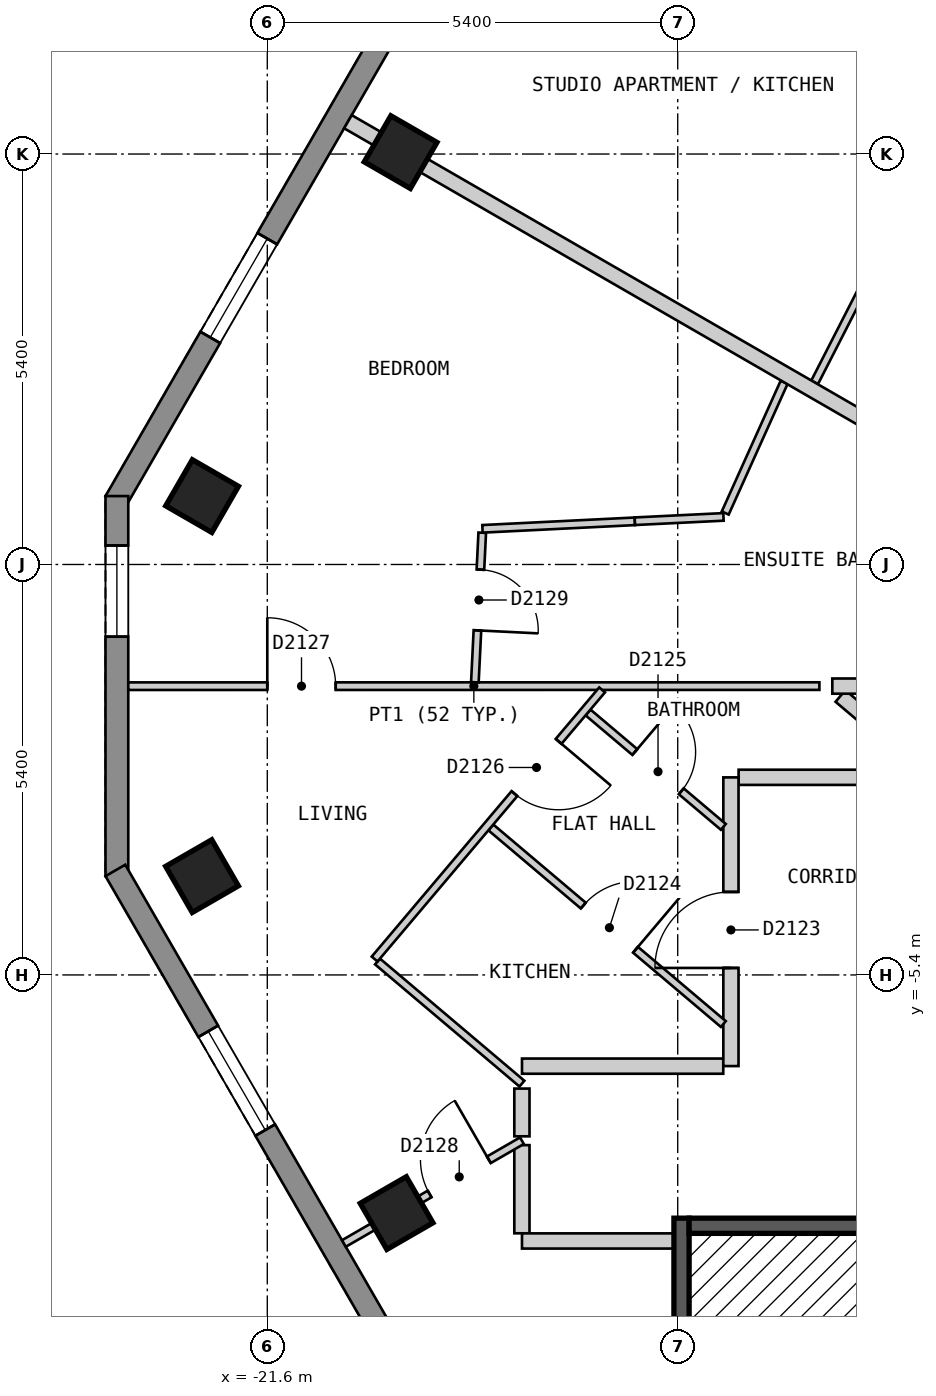
"""IFC4 building model, lengths in metres.
Left out: names, types, materials, properties, quantities, classifications, styles, units other than length and angle.
Written with IfcOpenShell. Run it as: python <this file> out.ifc"""

import sys

from ifc_helpers import new_model, si_unit, direction, frame, frame_2d, origin, origin_2d, place, context, subcontext, project, spatial, polyline, rectangle, outline, extrude, element, fill, save


model = new_model("IFC4")
c1 = context("Model", 3, precision=1e-05, world=origin(), true_north=direction((0.0, 1.0)))
c2 = subcontext(c1, "Body", "Model", "MODEL_VIEW")
j1 = project(units=[si_unit("LENGTHUNIT", "METRE"), si_unit("PLANEANGLEUNIT", "RADIAN")], contexts=[c1])
p1 = place(None, origin())
s1 = spatial("IfcSite", under=j1, at=p1, CompositionType="ELEMENT")
p2 = place(p1, origin())
s2 = spatial("IfcBuilding", under=s1, at=p2, CompositionType="ELEMENT")
p3 = place(p2, frame((0.0, 0.0, 205.8)))
s3 = spatial("IfcBuildingStorey", under=s2, at=p3, CompositionType="ELEMENT", Elevation=205.8)
for number, where, z_axis, x_axis in (
    (1, (-19.846, 5.425, 0.0), (0.0, 0.0, 1.0), (-0.5, -0.866, 0.0)),
    (2, (-22.458, 0.9, 0.0), (0.0, 0.0, 1.0), (-0.5, -0.866, 0.0)),
    (3, (-22.459, -4.1, 0.0), (0.0, 0.0, 1.0), (0.5, -0.866, 0.0)),
    (4, (-19.899, -8.533, 0.0), (0.0, 0.0, 1.0), (0.5, -0.866, 0.0)),
):
    element("IfcColumn", number, at=place(p3, frame(where, z_axis=z_axis, x_axis=x_axis)), inside=s3, PredefinedType="COLUMN", context=c2, shape_type="SweptSolid", body=[
        extrude(rectangle(XDim=0.7, YDim=0.7, at=origin_2d()), origin(), (0.0, 0.0, 1.0), 3.0),
    ])
p4 = place(p3, frame((-12.514, 20.025, 0.0), z_axis=(0.0, 0.0, 1.0), x_axis=(-0.500003656944, -0.866023292436, 0.0)))
e5 = element("IfcWall", 5, at=p4, inside=s3, PredefinedType="SOLIDWALL", context=c2, shape_type="SweptSolid", body=[
    extrude(outline(polyline([(0.0, -0.15), (22.17, -0.15), (22.09, 0.15), (0.08, 0.15), (0.0, -0.15)])), origin(), (0.0, 0.0, 1.0), 2.7),
])
p5 = place(p4, frame((2.497, 0.0, 0.15)))
e6 = element("IfcOpeningElement", 6, at=p5, cuts=e5, PredefinedType="OPENING", context=c2, shape_type="SweptSolid", body=[
    extrude(rectangle(XDim=1.5, YDim=2.1, at=frame_2d((0.75, 1.05))), frame((0.0, 0.16, 0.0), z_axis=(0.0, -1.0, 0.0), x_axis=(1.0, 0.0, 0.0)), (0.0, 0.0, 1.0), 0.32),
])
p6 = place(p4, frame((7.722, 0.0, 0.15)))
e7 = element("IfcOpeningElement", 7, at=p6, cuts=e5, PredefinedType="OPENING", context=c2, shape_type="SweptSolid", body=[
    extrude(rectangle(XDim=1.5, YDim=2.1, at=frame_2d((0.75, 1.05))), frame((0.0, 0.16, 0.0), z_axis=(0.0, -1.0, 0.0), x_axis=(1.0, 0.0, 0.0)), (0.0, 0.0, 1.0), 0.32),
])
p7 = place(p4, frame((12.948, 0.0, 0.15)))
e8 = element("IfcOpeningElement", 8, at=p7, cuts=e5, PredefinedType="OPENING", context=c2, shape_type="SweptSolid", body=[
    extrude(rectangle(XDim=1.5, YDim=2.1, at=frame_2d((0.75, 1.05))), frame((0.0, 0.16, 0.0), z_axis=(0.0, -1.0, 0.0), x_axis=(1.0, 0.0, 0.0)), (0.0, 0.0, 1.0), 0.32),
])
p8 = place(p4, frame((18.173, 0.0, 0.15)))
e9 = element("IfcOpeningElement", 9, at=p8, cuts=e5, PredefinedType="OPENING", context=c2, shape_type="SweptSolid", body=[
    extrude(rectangle(XDim=1.5, YDim=2.1, at=frame_2d((0.75, 1.05))), frame((0.0, 0.16, 0.0), z_axis=(0.0, -1.0, 0.0), x_axis=(1.0, 0.0, 0.0)), (0.0, 0.0, 1.0), 0.32),
])
p9 = place(p3, frame((-23.579, 0.9, 0.0), z_axis=(0.0, 0.0, 1.0), x_axis=(0.0, -1.0, 0.0)))
e10 = element("IfcWall", 10, at=p9, inside=s3, PredefinedType="SOLIDWALL", context=c2, shape_type="SweptSolid", body=[
    extrude(outline(polyline([(0.0, -0.15), (5.0, -0.15), (4.92, 0.15), (0.08, 0.15), (0.0, -0.15)])), origin(), (0.0, 0.0, 1.0), 2.7),
])
p10 = place(p9, frame((0.65, 0.0, 0.15)))
e11 = element("IfcOpeningElement", 11, at=p10, cuts=e10, PredefinedType="OPENING", context=c2, shape_type="SweptSolid", body=[
    extrude(rectangle(XDim=1.2, YDim=2.1, at=frame_2d((0.6, 1.05))), frame((0.0, 0.16, 0.0), z_axis=(0.0, -1.0, 0.0), x_axis=(1.0, 0.0, 0.0)), (0.0, 0.0, 1.0), 0.32),
])
p11 = place(p3, frame((-23.599, -4.025, 0.0), z_axis=(0.0, 0.0, 1.0), x_axis=(0.500012653391, -0.866018098222, 0.0)))
e12 = element("IfcWall", 12, at=p11, inside=s3, PredefinedType="SOLIDWALL", context=c2, shape_type="SweptSolid", body=[
    extrude(outline(polyline([(0.0, -0.15), (16.628, -0.15), (16.548, 0.15), (0.08, 0.15), (0.0, -0.15)])), origin(), (0.0, 0.0, 1.0), 2.7),
])
p12 = place(p11, frame((2.444, 0.0, 0.15)))
e13 = element("IfcOpeningElement", 13, at=p12, cuts=e12, PredefinedType="OPENING", context=c2, shape_type="SweptSolid", body=[
    extrude(rectangle(XDim=1.5, YDim=2.1, at=frame_2d((0.75, 1.05))), frame((0.0, 0.16, 0.0), z_axis=(0.0, -1.0, 0.0), x_axis=(1.0, 0.0, 0.0)), (0.0, 0.0, 1.0), 0.32),
])
p13 = place(p11, frame((7.564, 0.0, 0.15)))
e14 = element("IfcOpeningElement", 14, at=p13, cuts=e12, PredefinedType="OPENING", context=c2, shape_type="SweptSolid", body=[
    extrude(rectangle(XDim=1.5, YDim=2.1, at=frame_2d((0.75, 1.05))), frame((0.0, 0.16, 0.0), z_axis=(0.0, -1.0, 0.0), x_axis=(1.0, 0.0, 0.0)), (0.0, 0.0, 1.0), 0.32),
])
p14 = place(p11, frame((12.682, 0.0, 0.15)))
e15 = element("IfcOpeningElement", 15, at=p14, cuts=e12, PredefinedType="OPENING", context=c2, shape_type="SweptSolid", body=[
    extrude(rectangle(XDim=1.5, YDim=2.1, at=frame_2d((0.75, 1.05))), frame((0.0, 0.16, 0.0), z_axis=(0.0, -1.0, 0.0), x_axis=(1.0, 0.0, 0.0)), (0.0, 0.0, 1.0), 0.32),
])
p15 = place(p3, frame((-18.25, -7.639, 0.0), z_axis=(0.0, 0.0, 1.0), x_axis=(0.0, -1.0, 0.0)))
e16 = element("IfcWall", 16, at=p15, inside=s3, PredefinedType="PARTITIONING", context=c2, shape_type="SweptSolid", body=[
    extrude(rectangle(XDim=1.16, YDim=0.2, at=frame_2d((0.58, 0.0))), origin(), (0.0, 0.0, 1.0), 2.7),
])
p16 = place(p3, frame((-18.249, -6.6, 0.0), z_axis=(0.0, 0.0, 1.0), x_axis=(1.0, 0.0, 0.0)))
e17 = element("IfcWall", 17, at=p16, inside=s3, PredefinedType="PARTITIONING", context=c2, shape_type="SweptSolid", body=[
    extrude(rectangle(XDim=2.648, YDim=0.2, at=frame_2d((1.324, 0.0))), origin(), (0.0, 0.0, 1.0), 2.7),
])
p17 = place(p3, frame((-18.249, -8.9, 0.0), z_axis=(0.0, 0.0, 1.0), x_axis=(1.0, 0.0, 0.0)))
e18 = element("IfcWall", 18, at=p17, inside=s3, PredefinedType="PARTITIONING", context=c2, shape_type="SweptSolid", body=[
    extrude(rectangle(XDim=2.199, YDim=0.2, at=frame_2d((1.1, 0.0))), origin(), (0.0, 0.0, 1.0), 2.7),
])
p18 = place(p3, frame((-15.399, -2.8, 0.0), z_axis=(0.0, 0.0, 1.0), x_axis=(1.0, 0.0, 0.0)))
e19 = element("IfcWall", 19, at=p18, inside=s3, PredefinedType="PARTITIONING", context=c2, shape_type="SweptSolid", body=[
    extrude(rectangle(XDim=1.825, YDim=0.2, at=frame_2d((0.913, 0.0))), origin(), (0.0, 0.0, 1.0), 2.7),
])
p19 = place(p3, frame((-15.5, -6.599, 0.0), z_axis=(0.0, 0.0, 1.0), x_axis=(0.0, 1.0, 0.0)))
e20 = element("IfcWall", 20, at=p19, inside=s3, PredefinedType="PARTITIONING", context=c2, shape_type="SweptSolid", body=[
    extrude(rectangle(XDim=3.798, YDim=0.2, at=frame_2d((1.899, 0.0))), origin(), (0.0, 0.0, 1.0), 2.7),
])
p20 = place(p19, frame((1.291, 0.0, 0.0)))
e21 = element("IfcOpeningElement", 21, at=p20, cuts=e20, PredefinedType="OPENING", context=c2, shape_type="SweptSolid", body=[
    extrude(rectangle(XDim=1.0, YDim=2.1, at=frame_2d((0.5, 1.05))), frame((0.0, 0.11, 0.0), z_axis=(0.0, -1.0, 0.0), x_axis=(1.0, 0.0, 0.0)), (0.0, 0.0, 1.0), 0.22),
])
p21 = place(p3, frame((-18.25, -7.523, 0.0), z_axis=(0.0, 0.0, 1.0), x_axis=(0.0, 1.0, 0.0)))
e22 = element("IfcWall", 22, at=p21, inside=s3, PredefinedType="PARTITIONING", context=c2, shape_type="SweptSolid", body=[
    extrude(rectangle(XDim=0.628, YDim=0.2, at=frame_2d((0.314, 0.0))), origin(), (0.0, 0.0, 1.0), 2.7),
])
p22 = place(p3, frame((-17.38, -1.947, 0.0), z_axis=(0.0, 0.0, 1.0), x_axis=(0.763616683524, -0.645669854217, 0.0)))
e23 = element("IfcWall", 23, at=p22, inside=s3, PredefinedType="PARTITIONING", context=c2, shape_type="SweptSolid", body=[
    extrude(rectangle(XDim=2.331, YDim=0.1, at=frame_2d((1.166, 0.0))), origin(), (0.0, 0.0, 1.0), 2.7),
])
p23 = place(p22, frame((0.806, 0.0, 0.0)))
e24 = element("IfcOpeningElement", 24, at=p23, cuts=e23, PredefinedType="OPENING", context=c2, shape_type="SweptSolid", body=[
    extrude(rectangle(XDim=0.8, YDim=2.1, at=frame_2d((0.4, 1.05))), frame((0.0, 0.06, 0.0), z_axis=(0.0, -1.0, 0.0), x_axis=(1.0, 0.0, 0.0)), (0.0, 0.0, 1.0), 0.12),
])
p24 = place(p3, frame((-18.659, -3.459, 0.0), z_axis=(0.0, 0.0, 1.0), x_axis=(0.763550385572, -0.64574825489, 0.0)))
e25 = element("IfcWall", 25, at=p24, inside=s3, PredefinedType="PARTITIONING", context=c2, shape_type="SweptSolid", body=[
    extrude(rectangle(XDim=4.006, YDim=0.1, at=frame_2d((2.003, 0.0))), origin(), (0.0, 0.0, 1.0), 2.7),
])
p25 = place(p24, frame((1.593, 0.0, 0.0)))
e26 = element("IfcOpeningElement", 26, at=p25, cuts=e25, PredefinedType="OPENING", context=c2, shape_type="SweptSolid", body=[
    extrude(rectangle(XDim=0.9, YDim=2.1, at=frame_2d((0.45, 1.05))), frame((0.0, 0.06, 0.0), z_axis=(0.0, -1.0, 0.0), x_axis=(1.0, 0.0, 0.0)), (0.0, 0.0, 1.0), 0.12),
])
p26 = place(p3, frame((-20.15, -5.223, 0.0), z_axis=(0.0, 0.0, 1.0), x_axis=(0.763471868926, -0.645841083672, 0.0)))
e27 = element("IfcWall", 27, at=p26, inside=s3, PredefinedType="PARTITIONING", context=c2, shape_type="SweptSolid", body=[
    extrude(rectangle(XDim=2.489, YDim=0.1, at=frame_2d((1.244, 0.0))), origin(), (0.0, 0.0, 1.0), 2.7),
])
p27 = place(p3, frame((-23.429, -1.601, 0.0), z_axis=(0.0, 0.0, 1.0), x_axis=(0.999999994233, 0.000107396965, 0.0)))
e28 = element("IfcWall", 28, at=p27, inside=s3, PredefinedType="PARTITIONING", context=c2, shape_type="SweptSolid", body=[
    extrude(rectangle(XDim=9.093, YDim=0.1, at=frame_2d((4.546, 0.0))), origin(), (0.0, 0.0, 1.0), 2.7),
])
p28 = place(p27, frame((1.829, 0.0, 0.0)))
e29 = element("IfcOpeningElement", 29, at=p28, cuts=e28, PredefinedType="OPENING", context=c2, shape_type="SweptSolid", body=[
    extrude(rectangle(XDim=0.9, YDim=2.1, at=frame_2d((0.45, 1.05))), frame((0.0, 0.06, 0.0), z_axis=(0.0, -1.0, 0.0), x_axis=(1.0, 0.0, 0.0)), (0.0, 0.0, 1.0), 0.12),
])
p29 = place(p3, frame((-20.188, -5.191, 0.0), z_axis=(0.0, 0.0, 1.0), x_axis=(0.645524337256, 0.763739700429, 0.0)))
e30 = element("IfcWall", 30, at=p29, inside=s3, PredefinedType="PARTITIONING", context=c2, shape_type="SweptSolid", body=[
    extrude(rectangle(XDim=4.636, YDim=0.1, at=frame_2d((2.318, 0.0))), origin(), (0.0, 0.0, 1.0), 2.7),
])
p30 = place(p29, frame((2.85, 0.0, 0.0)))
e31 = element("IfcOpeningElement", 31, at=p30, cuts=e30, PredefinedType="OPENING", context=c2, shape_type="SweptSolid", body=[
    extrude(rectangle(XDim=0.9, YDim=2.1, at=frame_2d((0.45, 1.05))), frame((0.0, 0.06, 0.0), z_axis=(0.0, -1.0, 0.0), x_axis=(1.0, 0.0, 0.0)), (0.0, 0.0, 1.0), 0.12),
])
p31 = place(p3, frame((-15.575, 0.677, 0.0), z_axis=(0.0, 0.0, 1.0), x_axis=(0.410768223147, 0.911739802165, 0.0)))
e32 = element("IfcWall", 32, at=p31, inside=s3, PredefinedType="PARTITIONING", context=c2, shape_type="SweptSolid", body=[
    extrude(rectangle(XDim=1.886, YDim=0.1, at=frame_2d((0.943, 0.0))), origin(), (0.0, 0.0, 1.0), 2.7),
])
p32 = place(p3, frame((-14.399, 2.396, 0.0), z_axis=(0.0, 0.0, 1.0), x_axis=(0.455967231787, 0.889996563778, 0.0)))
e33 = element("IfcWall", 33, at=p32, inside=s3, PredefinedType="PARTITIONING", context=c2, shape_type="SweptSolid", body=[
    extrude(rectangle(XDim=3.149, YDim=0.1, at=frame_2d((1.575, 0.0))), origin(), (0.0, 0.0, 1.0), 2.7),
])
p33 = place(p3, frame((-18.869, -1.55, 0.0), z_axis=(0.0, 0.0, 1.0), x_axis=(0.049189853645, 0.998789446429, 0.0)))
e34 = element("IfcWall", 34, at=p33, inside=s3, PredefinedType="PARTITIONING", context=c2, shape_type="SweptSolid", body=[
    extrude(rectangle(XDim=1.97, YDim=0.1, at=frame_2d((0.985, 0.0))), origin(), (0.0, 0.0, 1.0), 2.7),
])
p34 = place(p33, frame((0.684, 0.0, 0.0)))
e35 = element("IfcOpeningElement", 35, at=p34, cuts=e34, PredefinedType="OPENING", context=c2, shape_type="SweptSolid", body=[
    extrude(rectangle(XDim=0.8, YDim=2.1, at=frame_2d((0.4, 1.05))), frame((0.0, 0.06, 0.0), z_axis=(0.0, -1.0, 0.0), x_axis=(1.0, 0.0, 0.0)), (0.0, 0.0, 1.0), 0.12),
])
p35 = place(p3, frame((-18.769, 0.469, 0.0), z_axis=(0.0, 0.0, 1.0), x_axis=(0.998780383332, 0.049373534108, 0.0)))
e36 = element("IfcWall", 36, at=p35, inside=s3, PredefinedType="PARTITIONING", context=c2, shape_type="SweptSolid", body=[
    extrude(rectangle(XDim=2.008, YDim=0.1, at=frame_2d((1.004, 0.0))), origin(), (0.0, 0.0, 1.0), 2.7),
])
p36 = place(p3, frame((-16.764, 0.569, 0.0), z_axis=(0.0, 0.0, 1.0), x_axis=(0.998812102885, 0.048727642373, 0.0)))
e37 = element("IfcWall", 37, at=p36, inside=s3, PredefinedType="PARTITIONING", context=c2, shape_type="SweptSolid", body=[
    extrude(rectangle(XDim=1.167, YDim=0.1, at=frame_2d((0.584, 0.0))), origin(), (0.0, 0.0, 1.0), 2.7),
])
p37 = place(p3, frame((-20.592, -8.933, 0.0), z_axis=(0.0, 0.0, 1.0), x_axis=(0.866045775131, 0.499964714133, 0.0)))
e38 = element("IfcWall", 38, at=p37, inside=s3, PredefinedType="PARTITIONING", context=c2, shape_type="SweptSolid", body=[
    extrude(rectangle(XDim=2.704, YDim=0.1, at=frame_2d((1.352, 0.0))), origin(), (0.0, 0.0, 1.0), 2.7),
])
p38 = place(p37, frame((1.302, 0.0, 0.0)))
e39 = element("IfcOpeningElement", 39, at=p38, cuts=e38, PredefinedType="OPENING", context=c2, shape_type="SweptSolid", body=[
    extrude(rectangle(XDim=0.9, YDim=2.1, at=frame_2d((0.45, 1.05))), frame((0.0, 0.06, 0.0), z_axis=(0.0, -1.0, 0.0), x_axis=(1.0, 0.0, 0.0)), (0.0, 0.0, 1.0), 0.12),
])
p39 = place(p3, frame((-20.539, 5.825, 0.0), z_axis=(0.0, 0.0, 1.0), x_axis=(0.866046068403, -0.499964206122, 0.0)))
e40 = element("IfcWall", 40, at=p39, inside=s3, PredefinedType="PARTITIONING", context=c2, shape_type="SweptSolid", body=[
    extrude(rectangle(XDim=9.995, YDim=0.2, at=frame_2d((4.998, 0.0))), origin(), (0.0, 0.0, 1.0), 2.7),
])
p40 = place(p3, frame((-17.926, 10.35, 0.0), z_axis=(0.0, 0.0, 1.0), x_axis=(0.866018411306, -0.500012111133, 0.0)))
e41 = element("IfcWall", 41, at=p40, inside=s3, PredefinedType="PARTITIONING", context=c2, shape_type="SweptSolid", body=[
    extrude(rectangle(XDim=9.898, YDim=0.2, at=frame_2d((4.949, 0.0))), origin(), (0.0, 0.0, 1.0), 2.7),
])
p41 = place(p3, frame((-14.059, -1.73, 0.0), z_axis=(0.0, 0.0, 1.0), x_axis=(0.763289607824, -0.64605647941, 0.0)))
e42 = element("IfcWall", 42, at=p41, inside=s3, PredefinedType="PARTITIONING", context=c2, shape_type="SweptSolid", body=[
    extrude(rectangle(XDim=0.766, YDim=0.2, at=frame_2d((0.383, 0.0))), origin(), (0.0, 0.0, 1.0), 2.7),
])
p42 = place(p3, frame((-14.166, -1.6, 0.0), z_axis=(0.0, 0.0, 1.0), x_axis=(1.0, 0.0, 0.0)))
e43 = element("IfcWall", 43, at=p42, inside=s3, PredefinedType="PARTITIONING", context=c2, shape_type="SweptSolid", body=[
    extrude(rectangle(XDim=0.973, YDim=0.2, at=frame_2d((0.486, 0.0))), origin(), (0.0, 0.0, 1.0), 2.7),
])
p43 = place(p3, frame((-16.15, -14.4, 0.0), z_axis=(0.0, 0.0, 1.0), x_axis=(0.0, 1.0, 0.0)))
e44 = element("IfcWall", 44, at=p43, inside=s3, PredefinedType="SOLIDWALL", context=c2, shape_type="SweptSolid", body=[
    extrude(rectangle(XDim=5.8, YDim=0.2, at=frame_2d((2.9, 0.0))), origin(), (0.0, 0.0, 1.0), 2.7),
])
p44 = place(p3, frame((-16.05, -8.7, 0.0), z_axis=(0.0, 0.0, 1.0), x_axis=(1.0, 0.0, 0.0)))
e45 = element("IfcWall", 45, at=p44, inside=s3, PredefinedType="SOLIDWALL", context=c2, shape_type="SweptSolid", body=[
    extrude(rectangle(XDim=2.75, YDim=0.2, at=frame_2d((1.375, 0.0))), origin(), (0.0, 0.0, 1.0), 2.7),
])
p45 = place(p8, origin())
e46 = element("IfcWindow", 46, at=p45, inside=s3, PartitioningType="SINGLE_PANEL", PredefinedType="WINDOW", context=c2, shape_type="SweptSolid", body=[
    extrude(rectangle(XDim=1.5, YDim=2.1, at=frame_2d((0.75, 1.05))), frame((0.0, 0.03, 0.0), z_axis=(0.0, -1.0, 0.0), x_axis=(1.0, 0.0, 0.0)), (0.0, 0.0, 1.0), 0.06),
])
fill(e9, e46)
p46 = place(p10, origin())
e47 = element("IfcWindow", 47, at=p46, inside=s3, PartitioningType="SINGLE_PANEL", PredefinedType="WINDOW", context=c2, shape_type="SweptSolid", body=[
    extrude(rectangle(XDim=1.2, YDim=2.1, at=frame_2d((0.6, 1.05))), frame((0.0, 0.03, 0.0), z_axis=(0.0, -1.0, 0.0), x_axis=(1.0, 0.0, 0.0)), (0.0, 0.0, 1.0), 0.06),
])
fill(e11, e47)
p47 = place(p12, origin())
e48 = element("IfcWindow", 48, at=p47, inside=s3, PartitioningType="SINGLE_PANEL", PredefinedType="WINDOW", context=c2, shape_type="SweptSolid", body=[
    extrude(rectangle(XDim=1.5, YDim=2.1, at=frame_2d((0.75, 1.05))), frame((0.0, 0.03, 0.0), z_axis=(0.0, -1.0, 0.0), x_axis=(1.0, 0.0, 0.0)), (0.0, 0.0, 1.0), 0.06),
])
fill(e13, e48)
p48 = place(p20, origin())
e49 = element("IfcDoor", 49, at=p48, inside=s3, OperationType="SINGLE_SWING_LEFT", PredefinedType="DOOR", context=c2, shape_type="SweptSolid", body=[
    extrude(rectangle(XDim=1.0, YDim=2.1, at=frame_2d((0.5, 1.05))), frame((0.0, 0.025, 0.0), z_axis=(0.0, -1.0, 0.0), x_axis=(1.0, 0.0, 0.0)), (0.0, 0.0, 1.0), 0.05),
])
fill(e21, e49)
p49 = place(p25, origin())
e50 = element("IfcDoor", 50, at=p49, inside=s3, OperationType="SINGLE_SWING_RIGHT", PredefinedType="DOOR", context=c2, shape_type="SweptSolid", body=[
    extrude(rectangle(XDim=0.9, YDim=2.1, at=frame_2d((0.45, 1.05))), frame((0.0, 0.025, 0.0), z_axis=(0.0, -1.0, 0.0), x_axis=(1.0, 0.0, 0.0)), (0.0, 0.0, 1.0), 0.05),
])
fill(e26, e50)
p50 = place(p23, origin())
e51 = element("IfcDoor", 51, at=p50, inside=s3, OperationType="SINGLE_SWING_LEFT", PredefinedType="DOOR", context=c2, shape_type="SweptSolid", body=[
    extrude(rectangle(XDim=0.8, YDim=2.1, at=frame_2d((0.4, 1.05))), frame((0.0, 0.025, 0.0), z_axis=(0.0, -1.0, 0.0), x_axis=(1.0, 0.0, 0.0)), (0.0, 0.0, 1.0), 0.05),
])
fill(e24, e51)
p51 = place(p30, origin())
e52 = element("IfcDoor", 52, at=p51, inside=s3, OperationType="SINGLE_SWING_RIGHT", PredefinedType="DOOR", context=c2, shape_type="SweptSolid", body=[
    extrude(rectangle(XDim=0.9, YDim=2.1, at=frame_2d((0.45, 1.05))), frame((0.0, 0.025, 0.0), z_axis=(0.0, -1.0, 0.0), x_axis=(1.0, 0.0, 0.0)), (0.0, 0.0, 1.0), 0.05),
])
fill(e31, e52)
p52 = place(p28, origin())
e53 = element("IfcDoor", 53, at=p52, inside=s3, OperationType="SINGLE_SWING_LEFT", PredefinedType="DOOR", context=c2, shape_type="SweptSolid", body=[
    extrude(rectangle(XDim=0.9, YDim=2.1, at=frame_2d((0.45, 1.05))), frame((0.0, 0.025, 0.0), z_axis=(0.0, -1.0, 0.0), x_axis=(1.0, 0.0, 0.0)), (0.0, 0.0, 1.0), 0.05),
])
fill(e29, e53)
p53 = place(p38, origin())
e54 = element("IfcDoor", 54, at=p53, inside=s3, OperationType="SINGLE_SWING_RIGHT", PredefinedType="DOOR", context=c2, shape_type="SweptSolid", body=[
    extrude(rectangle(XDim=0.9, YDim=2.1, at=frame_2d((0.45, 1.05))), frame((0.0, 0.025, 0.0), z_axis=(0.0, -1.0, 0.0), x_axis=(1.0, 0.0, 0.0)), (0.0, 0.0, 1.0), 0.05),
])
fill(e39, e54)
p54 = place(p34, origin())
e55 = element("IfcDoor", 55, at=p54, inside=s3, OperationType="SINGLE_SWING_LEFT", PredefinedType="DOOR", context=c2, shape_type="SweptSolid", body=[
    extrude(rectangle(XDim=0.8, YDim=2.1, at=frame_2d((0.4, 1.05))), frame((0.0, 0.025, 0.0), z_axis=(0.0, -1.0, 0.0), x_axis=(1.0, 0.0, 0.0)), (0.0, 0.0, 1.0), 0.05),
])
fill(e35, e55)
save(model, sys.argv[1])
